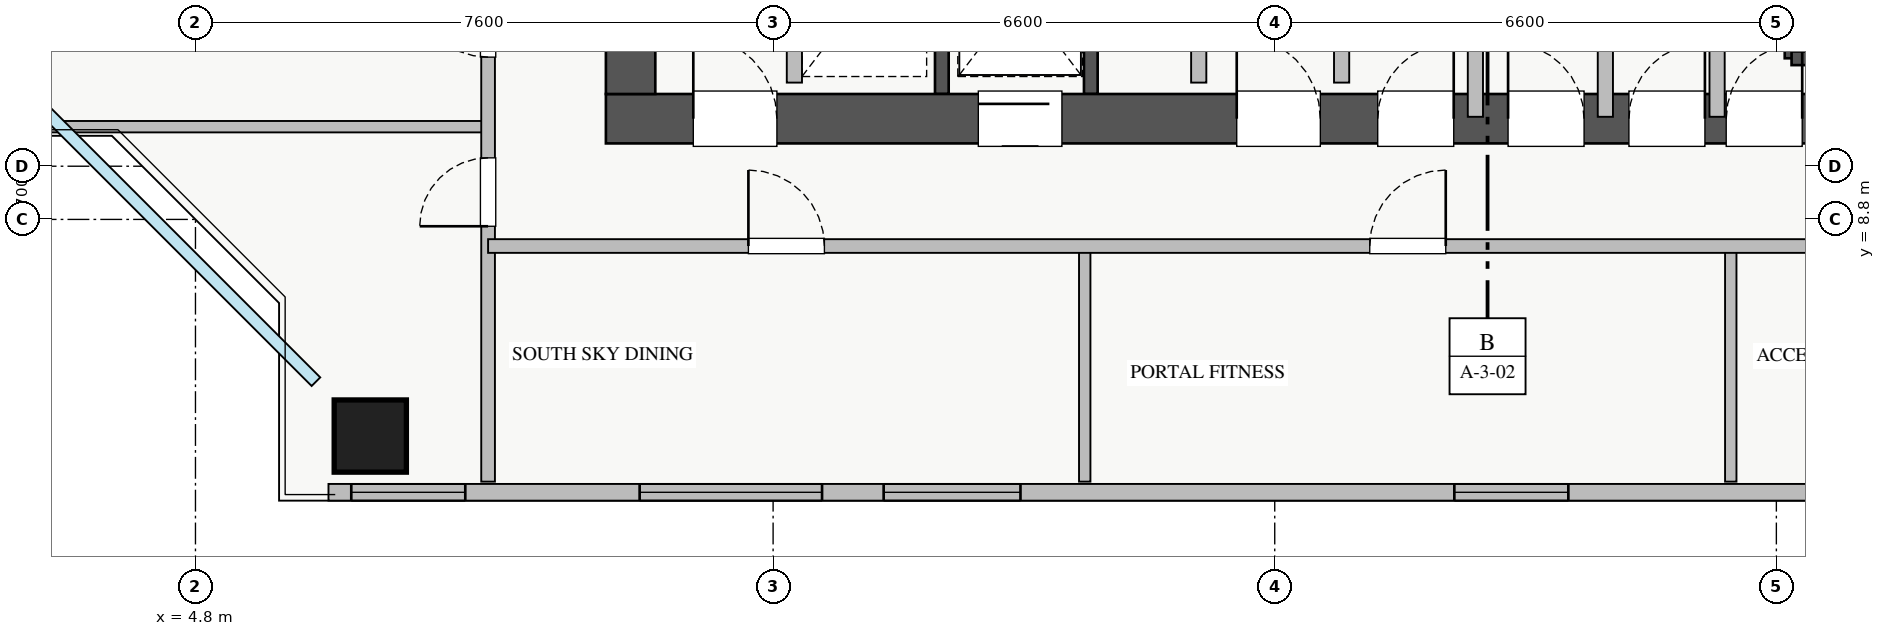
"""IFC4 building model, lengths in metres.
Left out: names, types, materials, properties, quantities, classifications, styles, units other than length and angle.
Written with IfcOpenShell. Run it as: python <this file> out.ifc"""

import sys

from ifc_helpers import new_model, si_unit, direction, frame, frame_2d, origin, origin_2d, place, context, subcontext, project, spatial, rectangle, extrude, source, transform, mapped, element, fill, save


model = new_model("IFC4")
c1 = context("Model", 3, precision=1e-05, world=origin(), true_north=direction((0.0, 1.0)))
c2 = subcontext(c1, "Body", "Model", "MODEL_VIEW")
j1 = project(units=[si_unit("LENGTHUNIT", "METRE"), si_unit("PLANEANGLEUNIT", "RADIAN")], contexts=[c1])
p1 = place(None, origin())
s1 = spatial("IfcSite", under=j1, at=p1, CompositionType="ELEMENT")
p2 = place(p1, origin())
s2 = spatial("IfcBuilding", under=s1, at=p2, CompositionType="ELEMENT")
p3 = place(p2, frame((0.0, 0.0, 153.5)))
s3 = spatial("IfcBuildingStorey", under=s2, at=p3, CompositionType="ELEMENT", Elevation=153.5)
p4 = place(p3, frame((14.62, 10.45, 0.0), z_axis=(0.0, 0.0, 1.0), x_axis=(0.0, 1.0, 0.0)))
e1 = element("IfcWall", 1, at=p4, inside=s3, PredefinedType="SHEAR", context=c2, shape_type="SweptSolid", body=[
    extrude(rectangle(XDim=2.35, YDim=0.18, at=frame_2d((1.175, 0.0))), origin(), (0.0, 0.0, 1.0), 3.07),
])
p5 = place(p3, frame((25.8, 10.92, 0.0), z_axis=(0.0, 0.0, 1.0), x_axis=(0.0, 1.0, 0.0)))
e2 = element("IfcWall", 2, at=p5, inside=s3, PredefinedType="SHEAR", context=c2, shape_type="SweptSolid", body=[
    extrude(rectangle(XDim=1.06, YDim=0.18, at=frame_2d((0.53, 0.0))), origin(), (0.0, 0.0, 1.0), 3.07),
])
p6 = place(p3, frame((25.8, 10.92, 0.0), z_axis=(0.0, 0.0, 1.0), x_axis=(1.0, 0.0, 0.0)))
e3 = element("IfcWall", 3, at=p6, inside=s3, PredefinedType="SHEAR", context=c2, shape_type="SweptSolid", body=[
    extrude(rectangle(XDim=1.35, YDim=0.18, at=frame_2d((0.675, 0.0))), origin(), (0.0, 0.0, 1.0), 3.07),
])
p7 = place(p3, frame((16.58, 10.45, 0.0), z_axis=(0.0, 0.0, 1.0), x_axis=(0.0, 1.0, 0.0)))
e4 = element("IfcWall", 4, at=p7, inside=s3, PredefinedType="SHEAR", context=c2, shape_type="SweptSolid", body=[
    extrude(rectangle(XDim=2.35, YDim=0.18, at=frame_2d((1.175, 0.0))), origin(), (0.0, 0.0, 1.0), 3.07),
])
p8 = place(p3, frame((10.2, 10.125, 0.0), z_axis=(0.0, 0.0, 1.0), x_axis=(1.0, 0.0, 0.0)))
e5 = element("IfcWall", 5, at=p8, inside=s3, PredefinedType="SHEAR", context=c2, shape_type="SweptSolid", body=[
    extrude(rectangle(XDim=17.6, YDim=0.65, at=frame_2d((8.8, 0.0))), origin(), (0.0, 0.0, 1.0), 3.25),
])
p9 = place(p8, frame((1.15, 0.0, 0.0)))
e6 = element("IfcOpeningElement", 6, at=p9, cuts=e5, PredefinedType="OPENING", context=c2, shape_type="SweptSolid", body=[
    extrude(rectangle(XDim=1.1, YDim=2.05, at=frame_2d((0.55, 1.025))), frame((0.0, 0.335, 0.0), z_axis=(0.0, -1.0, 0.0), x_axis=(1.0, 0.0, 0.0)), (0.0, 0.0, 1.0), 0.67),
])
p10 = place(p8, frame((8.3, 0.0, 0.0)))
e7 = element("IfcOpeningElement", 7, at=p10, cuts=e5, PredefinedType="OPENING", context=c2, shape_type="SweptSolid", body=[
    extrude(rectangle(XDim=1.1, YDim=2.05, at=frame_2d((0.55, 1.025))), frame((0.0, 0.335, 0.0), z_axis=(0.0, -1.0, 0.0), x_axis=(1.0, 0.0, 0.0)), (0.0, 0.0, 1.0), 0.67),
])
p11 = place(p8, frame((4.9, 0.0, 0.0)))
e8 = element("IfcOpeningElement", 8, at=p11, cuts=e5, PredefinedType="OPENING", context=c2, shape_type="SweptSolid", body=[
    extrude(rectangle(XDim=1.1, YDim=2.05, at=frame_2d((0.55, 1.025))), frame((0.0, 0.335, 0.0), z_axis=(0.0, -1.0, 0.0), x_axis=(1.0, 0.0, 0.0)), (0.0, 0.0, 1.0), 0.67),
])
p12 = place(p8, frame((14.74, 0.0, 0.0)))
e9 = element("IfcOpeningElement", 9, at=p12, cuts=e5, PredefinedType="OPENING", context=c2, shape_type="SweptSolid", body=[
    extrude(rectangle(XDim=1.0, YDim=2.05, at=frame_2d((0.5, 1.025))), frame((0.0, 0.335, 0.0), z_axis=(0.0, -1.0, 0.0), x_axis=(1.0, 0.0, 0.0)), (0.0, 0.0, 1.0), 0.67),
])
p13 = place(p8, frame((10.155, 0.0, 0.0)))
e10 = element("IfcOpeningElement", 10, at=p13, cuts=e5, PredefinedType="OPENING", context=c2, shape_type="SweptSolid", body=[
    extrude(rectangle(XDim=1.0, YDim=2.05, at=frame_2d((0.5, 1.025))), frame((0.0, 0.335, 0.0), z_axis=(0.0, -1.0, 0.0), x_axis=(1.0, 0.0, 0.0)), (0.0, 0.0, 1.0), 0.67),
])
p14 = place(p8, frame((11.87, 0.0, 0.0)))
e11 = element("IfcOpeningElement", 11, at=p14, cuts=e5, PredefinedType="OPENING", context=c2, shape_type="SweptSolid", body=[
    extrude(rectangle(XDim=1.0, YDim=2.05, at=frame_2d((0.5, 1.025))), frame((0.0, 0.335, 0.0), z_axis=(0.0, -1.0, 0.0), x_axis=(1.0, 0.0, 0.0)), (0.0, 0.0, 1.0), 0.67),
])
p15 = place(p8, frame((13.46, 0.0, 0.0)))
e12 = element("IfcOpeningElement", 12, at=p15, cuts=e5, PredefinedType="OPENING", context=c2, shape_type="SweptSolid", body=[
    extrude(rectangle(XDim=1.0, YDim=2.05, at=frame_2d((0.5, 1.025))), frame((0.0, 0.335, 0.0), z_axis=(0.0, -1.0, 0.0), x_axis=(1.0, 0.0, 0.0)), (0.0, 0.0, 1.0), 0.67),
])
p16 = place(p3, frame((10.525, 10.45, 0.0), z_axis=(0.0, 0.0, 1.0), x_axis=(0.0, 1.0, 0.0)))
e13 = element("IfcWall", 13, at=p16, inside=s3, PredefinedType="SHEAR", context=c2, shape_type="SweptSolid", body=[
    extrude(rectangle(XDim=5.9, YDim=0.65, at=frame_2d((2.95, 0.0))), origin(), (0.0, 0.0, 1.0), 3.25),
])
m1 = source(origin(), c2, "Body", "SweptSolid", [
    extrude(rectangle(XDim=0.95, YDim=0.95, at=origin_2d()), origin(), (0.0, 0.0, 1.0), 3.25),
])
p17 = place(p3, frame((7.1, 5.95, 0.0), z_axis=(0.0, 0.0, 1.0), x_axis=(1.0, 0.0, 0.0)))
e14 = element("IfcColumn", 14, at=p17, inside=s3, PredefinedType="COLUMN", context=c2, shape_type="MappedRepresentation", body=[
    mapped(m1, transform((0.0, 0.0, 0.0), x_axis=(1.0, 0.0, 0.0), y_axis=(0.0, 1.0, 0.0), z_axis=(0.0, 0.0, 1.0), scale=1.0)),
])
p18 = place(p3, frame((6.55, 5.21, 0.0), z_axis=(0.0, 0.0, 1.0), x_axis=(1.0, 0.0, 0.0)))
e15 = element("IfcWall", 15, at=p18, inside=s3, PredefinedType="STANDARD", context=c2, shape_type="SweptSolid", body=[
    extrude(rectangle(XDim=24.9, YDim=0.22, at=frame_2d((12.45, 0.0))), origin(), (0.0, 0.0, 1.0), 2.61),
])
p19 = place(p18, frame((0.3, 0.0, 0.9)))
e16 = element("IfcOpeningElement", 16, at=p19, cuts=e15, PredefinedType="OPENING", context=c2, shape_type="SweptSolid", body=[
    extrude(rectangle(XDim=1.5, YDim=1.5, at=frame_2d((0.75, 0.75))), frame((0.0, 0.12, 0.0), z_axis=(0.0, -1.0, 0.0), x_axis=(1.0, 0.0, 0.0)), (0.0, 0.0, 1.0), 0.24),
])
p20 = place(p18, frame((7.304, 0.0, 0.9)))
e17 = element("IfcOpeningElement", 17, at=p20, cuts=e15, PredefinedType="OPENING", context=c2, shape_type="SweptSolid", body=[
    extrude(rectangle(XDim=1.8, YDim=1.5, at=frame_2d((0.9, 0.75))), frame((0.0, 0.12, 0.0), z_axis=(0.0, -1.0, 0.0), x_axis=(1.0, 0.0, 0.0)), (0.0, 0.0, 1.0), 0.24),
])
p21 = place(p18, frame((14.813, 0.0, 0.9)))
e18 = element("IfcOpeningElement", 18, at=p21, cuts=e15, PredefinedType="OPENING", context=c2, shape_type="SweptSolid", body=[
    extrude(rectangle(XDim=1.5, YDim=1.45, at=frame_2d((0.75, 0.725))), frame((0.0, 0.12, 0.0), z_axis=(0.0, -1.0, 0.0), x_axis=(1.0, 0.0, 0.0)), (0.0, 0.0, 1.0), 0.24),
])
p22 = place(p18, frame((20.738, 0.0, 0.9)))
e19 = element("IfcOpeningElement", 19, at=p22, cuts=e15, PredefinedType="OPENING", context=c2, shape_type="SweptSolid", body=[
    extrude(rectangle(XDim=2.1, YDim=1.48, at=frame_2d((1.05, 0.74))), frame((0.0, 0.12, 0.0), z_axis=(0.0, -1.0, 0.0), x_axis=(1.0, 0.0, 0.0)), (0.0, 0.0, 1.0), 0.24),
])
p23 = place(p18, frame((4.094, 0.0, 0.9)))
e20 = element("IfcOpeningElement", 20, at=p23, cuts=e15, PredefinedType="OPENING", context=c2, shape_type="SweptSolid", body=[
    extrude(rectangle(XDim=2.4, YDim=1.5, at=frame_2d((1.2, 0.75))), frame((0.0, 0.12, 0.0), z_axis=(0.0, -1.0, 0.0), x_axis=(1.0, 0.0, 0.0)), (0.0, 0.0, 1.0), 0.24),
])
for number, where, z_axis, x_axis in (
    (21, (12.68, 10.6, 0.0), (0.0, 0.0, 1.0), (0.0, 1.0, 0.0)),
    (22, (18.0, 10.6, 0.0), (0.0, 0.0, 1.0), (0.0, 1.0, 0.0)),
    (23, (19.88, 10.6, 0.0), (0.0, 0.0, 1.0), (0.0, 1.0, 0.0)),
):
    element("IfcWall", number, at=place(p3, frame(where, z_axis=z_axis, x_axis=x_axis)), inside=s3, PredefinedType="PARTITIONING", context=c2, shape_type="SweptSolid", body=[
        extrude(rectangle(XDim=2.21, YDim=0.2, at=frame_2d((1.105, 0.0))), origin(), (0.0, 0.0, 1.0), 3.07),
    ])
for number, where, z_axis, x_axis in (
    (24, (24.82, 10.15, 0.0), (0.0, 0.0, 1.0), (0.0, 1.0, 0.0)),
    (25, (21.64, 10.15, 0.0), (0.0, 0.0, 1.0), (0.0, 1.0, 0.0)),
    (26, (23.35, 10.15, 0.0), (0.0, 0.0, 1.0), (0.0, 1.0, 0.0)),
):
    element("IfcWall", number, at=place(p3, frame(where, z_axis=z_axis, x_axis=x_axis)), inside=s3, PredefinedType="PARTITIONING", context=c2, shape_type="SweptSolid", body=[
        extrude(rectangle(XDim=2.65, YDim=0.2, at=frame_2d((1.325, 0.0))), origin(), (0.0, 0.0, 1.0), 3.07),
    ])
p24 = place(p3, frame((1.35, 10.02, 0.0), z_axis=(0.0, 0.0, 1.0), x_axis=(1.0, 0.0, 0.0)))
e27 = element("IfcWall", 27, at=p24, inside=s3, PredefinedType="PARTITIONING", context=c2, shape_type="SweptSolid", body=[
    extrude(rectangle(XDim=7.3, YDim=0.15, at=frame_2d((3.65, 0.0))), origin(), (0.0, 0.0, 1.0), 3.07),
])
p25 = place(p3, frame((8.65, 5.35, 0.0), z_axis=(0.0, 0.0, 1.0), x_axis=(0.0, 1.0, 0.0)))
e28 = element("IfcWall", 28, at=p25, inside=s3, PredefinedType="PARTITIONING", context=c2, shape_type="SweptSolid", body=[
    extrude(rectangle(XDim=11.35, YDim=0.18, at=frame_2d((5.675, 0.0))), origin(), (0.0, 0.0, 1.0), 3.07),
])
p26 = place(p25, frame((3.36, 0.0, 0.0)))
e29 = element("IfcOpeningElement", 29, at=p26, cuts=e28, PredefinedType="OPENING", context=c2, shape_type="SweptSolid", body=[
    extrude(rectangle(XDim=0.9, YDim=2.05, at=frame_2d((0.45, 1.025))), frame((0.0, 0.1, 0.0), z_axis=(0.0, -1.0, 0.0), x_axis=(1.0, 0.0, 0.0)), (0.0, 0.0, 1.0), 0.2),
])
p27 = place(p25, frame((5.585, 0.0, 0.0)))
e30 = element("IfcOpeningElement", 30, at=p27, cuts=e28, PredefinedType="OPENING", context=c2, shape_type="SweptSolid", body=[
    extrude(rectangle(XDim=1.0, YDim=2.05, at=frame_2d((0.5, 1.025))), frame((0.0, 0.1, 0.0), z_axis=(0.0, -1.0, 0.0), x_axis=(1.0, 0.0, 0.0)), (0.0, 0.0, 1.0), 0.2),
])
for number, where, z_axis, x_axis in (
    (31, (16.5, 5.35, 0.0), (0.0, 0.0, 1.0), (0.0, 1.0, 0.0)),
    (32, (25.0, 5.35, 0.0), (0.0, 0.0, 1.0), (0.0, 1.0, 0.0)),
):
    element("IfcWall", number, at=place(p3, frame(where, z_axis=z_axis, x_axis=x_axis)), inside=s3, PredefinedType="PARTITIONING", context=c2, shape_type="SweptSolid", body=[
        extrude(rectangle(XDim=3.1, YDim=0.15, at=frame_2d((1.55, 0.0))), origin(), (0.0, 0.0, 1.0), 3.07),
    ])
p28 = place(p3, frame((8.65, 8.45, 0.0), z_axis=(0.0, 0.0, 1.0), x_axis=(1.0, 0.0, 0.0)))
e33 = element("IfcWall", 33, at=p28, inside=s3, PredefinedType="PARTITIONING", context=c2, shape_type="SweptSolid", body=[
    extrude(rectangle(XDim=23.8, YDim=0.18, at=frame_2d((11.9, 0.0))), origin(), (0.0, 0.0, 1.0), 3.07),
])
p29 = place(p28, frame((3.425, 0.0, 0.0)))
e34 = element("IfcOpeningElement", 34, at=p29, cuts=e33, PredefinedType="OPENING", context=c2, shape_type="SweptSolid", body=[
    extrude(rectangle(XDim=1.0, YDim=2.05, at=frame_2d((0.5, 1.025))), frame((0.0, 0.1, 0.0), z_axis=(0.0, -1.0, 0.0), x_axis=(1.0, 0.0, 0.0)), (0.0, 0.0, 1.0), 0.2),
])
p30 = place(p28, frame((11.6, 0.0, 0.0)))
e35 = element("IfcOpeningElement", 35, at=p30, cuts=e33, PredefinedType="OPENING", context=c2, shape_type="SweptSolid", body=[
    extrude(rectangle(XDim=1.0, YDim=2.05, at=frame_2d((0.5, 1.025))), frame((0.0, 0.1, 0.0), z_axis=(0.0, -1.0, 0.0), x_axis=(1.0, 0.0, 0.0)), (0.0, 0.0, 1.0), 0.2),
])
p31 = place(p28, frame((19.575, 0.0, 0.0)))
e36 = element("IfcOpeningElement", 36, at=p31, cuts=e33, PredefinedType="OPENING", context=c2, shape_type="SweptSolid", body=[
    extrude(rectangle(XDim=1.0, YDim=2.05, at=frame_2d((0.5, 1.025))), frame((0.0, 0.1, 0.0), z_axis=(0.0, -1.0, 0.0), x_axis=(1.0, 0.0, 0.0)), (0.0, 0.0, 1.0), 0.2),
])
m2 = source(origin(), c2, "Body", "SweptSolid", [
    extrude(rectangle(XDim=1.5, YDim=1.5, at=frame_2d((0.75, 0.75))), frame((0.0, 0.03, 0.0), z_axis=(0.0, -1.0, 0.0), x_axis=(1.0, 0.0, 0.0)), (0.0, 0.0, 1.0), 0.06),
])
p32 = place(p19, origin())
e37 = element("IfcWindow", 37, at=p32, inside=s3, PartitioningType="TRIPLE_PANEL_VERTICAL", PredefinedType="WINDOW", context=c2, shape_type="MappedRepresentation", body=[
    mapped(m2, transform((0.0, 0.0, 0.0), x_axis=(1.0, 0.0, 0.0), y_axis=(0.0, 1.0, 0.0), z_axis=(0.0, 0.0, 1.0), scale=1.0)),
])
fill(e16, e37)
m3 = source(origin(), c2, "Body", "SweptSolid", [
    extrude(rectangle(XDim=1.8, YDim=1.5, at=frame_2d((0.9, 0.75))), frame((0.0, 0.03, 0.0), z_axis=(0.0, -1.0, 0.0), x_axis=(1.0, 0.0, 0.0)), (0.0, 0.0, 1.0), 0.06),
])
p33 = place(p20, origin())
e38 = element("IfcWindow", 38, at=p33, inside=s3, PartitioningType="DOUBLE_PANEL_VERTICAL", PredefinedType="WINDOW", context=c2, shape_type="MappedRepresentation", body=[
    mapped(m3, transform((0.0, 0.0, 0.0), x_axis=(1.0, 0.0, 0.0), y_axis=(0.0, 1.0, 0.0), z_axis=(0.0, 0.0, 1.0), scale=1.0)),
])
fill(e17, e38)
m4 = source(origin(), c2, "Body", "SweptSolid", [
    extrude(rectangle(XDim=1.5, YDim=1.45, at=frame_2d((0.75, 0.725))), frame((0.0, 0.03, 0.0), z_axis=(0.0, -1.0, 0.0), x_axis=(1.0, 0.0, 0.0)), (0.0, 0.0, 1.0), 0.06),
])
p34 = place(p21, origin())
e39 = element("IfcWindow", 39, at=p34, inside=s3, PartitioningType="DOUBLE_PANEL_VERTICAL", PredefinedType="WINDOW", context=c2, shape_type="MappedRepresentation", body=[
    mapped(m4, transform((0.0, 0.0, 0.0), x_axis=(1.0, 0.0, 0.0), y_axis=(0.0, 1.0, 0.0), z_axis=(0.0, 0.0, 1.0), scale=1.0)),
])
fill(e18, e39)
m5 = source(origin(), c2, "Body", "SweptSolid", [
    extrude(rectangle(XDim=1.1, YDim=2.05, at=frame_2d((0.55, 1.025))), frame((0.0, 0.025, 0.0), z_axis=(0.0, -1.0, 0.0), x_axis=(1.0, 0.0, 0.0)), (0.0, 0.0, 1.0), 0.05),
])
p35 = place(p9, origin())
e40 = element("IfcDoor", 40, at=p35, inside=s3, OperationType="SINGLE_SWING_LEFT", PredefinedType="DOOR", context=c2, shape_type="MappedRepresentation", body=[
    mapped(m5, transform((0.0, 0.0, 0.0), x_axis=(1.0, 0.0, 0.0), y_axis=(0.0, 1.0, 0.0), z_axis=(0.0, 0.0, 1.0), scale=1.0)),
])
fill(e6, e40)
p36 = place(p10, origin())
e41 = element("IfcDoor", 41, at=p36, inside=s3, OperationType="SINGLE_SWING_LEFT", PredefinedType="DOOR", context=c2, shape_type="MappedRepresentation", body=[
    mapped(m5, transform((0.0, 0.0, 0.0), x_axis=(1.0, 0.0, 0.0), y_axis=(0.0, 1.0, 0.0), z_axis=(0.0, 0.0, 1.0), scale=1.0)),
])
fill(e7, e41)
p37 = place(p11, origin())
e42 = element("IfcDoor", 42, at=p37, inside=s3, OperationType="SLIDING_TO_RIGHT", PredefinedType="DOOR", context=c2, shape_type="MappedRepresentation", body=[
    mapped(m5, transform((0.0, 0.0, 0.0), x_axis=(1.0, 0.0, 0.0), y_axis=(0.0, 1.0, 0.0), z_axis=(0.0, 0.0, 1.0), scale=1.0)),
])
fill(e8, e42)
m6 = source(origin(), c2, "Body", "SweptSolid", [
    extrude(rectangle(XDim=1.0, YDim=2.05, at=frame_2d((0.5, 1.025))), frame((0.0, 0.025, 0.0), z_axis=(0.0, -1.0, 0.0), x_axis=(1.0, 0.0, 0.0)), (0.0, 0.0, 1.0), 0.05),
])
p38 = place(p12, origin())
e43 = element("IfcDoor", 43, at=p38, inside=s3, OperationType="SINGLE_SWING_RIGHT", PredefinedType="DOOR", context=c2, shape_type="MappedRepresentation", body=[
    mapped(m6, transform((0.0, 0.0, 0.0), x_axis=(1.0, 0.0, 0.0), y_axis=(0.0, 1.0, 0.0), z_axis=(0.0, 0.0, 1.0), scale=1.0)),
])
fill(e9, e43)
p39 = place(p13, origin())
e44 = element("IfcDoor", 44, at=p39, inside=s3, OperationType="SINGLE_SWING_RIGHT", PredefinedType="DOOR", context=c2, shape_type="MappedRepresentation", body=[
    mapped(m6, transform((0.0, 0.0, 0.0), x_axis=(1.0, 0.0, 0.0), y_axis=(0.0, 1.0, 0.0), z_axis=(0.0, 0.0, 1.0), scale=1.0)),
])
fill(e10, e44)
p40 = place(p14, origin())
e45 = element("IfcDoor", 45, at=p40, inside=s3, OperationType="SINGLE_SWING_LEFT", PredefinedType="DOOR", context=c2, shape_type="MappedRepresentation", body=[
    mapped(m6, transform((0.0, 0.0, 0.0), x_axis=(1.0, 0.0, 0.0), y_axis=(0.0, 1.0, 0.0), z_axis=(0.0, 0.0, 1.0), scale=1.0)),
])
fill(e11, e45)
p41 = place(p15, origin())
e46 = element("IfcDoor", 46, at=p41, inside=s3, OperationType="SINGLE_SWING_RIGHT", PredefinedType="DOOR", context=c2, shape_type="MappedRepresentation", body=[
    mapped(m6, transform((0.0, 0.0, 0.0), x_axis=(1.0, 0.0, 0.0), y_axis=(0.0, 1.0, 0.0), z_axis=(0.0, 0.0, 1.0), scale=1.0)),
])
fill(e12, e46)
m7 = source(origin(), c2, "Body", "SweptSolid", [
    extrude(rectangle(XDim=0.9, YDim=2.05, at=frame_2d((0.45, 1.025))), frame((0.0, 0.025, 0.0), z_axis=(0.0, -1.0, 0.0), x_axis=(1.0, 0.0, 0.0)), (0.0, 0.0, 1.0), 0.05),
])
p42 = place(p26, origin())
e47 = element("IfcDoor", 47, at=p42, inside=s3, OperationType="SINGLE_SWING_LEFT", PredefinedType="DOOR", context=c2, shape_type="MappedRepresentation", body=[
    mapped(m7, transform((0.0, 0.0, 0.0), x_axis=(1.0, 0.0, 0.0), y_axis=(0.0, 1.0, 0.0), z_axis=(0.0, 0.0, 1.0), scale=1.0)),
])
fill(e29, e47)
p43 = place(p27, origin())
e48 = element("IfcDoor", 48, at=p43, inside=s3, OperationType="SINGLE_SWING_RIGHT", PredefinedType="DOOR", context=c2, shape_type="MappedRepresentation", body=[
    mapped(m6, transform((0.0, 0.0, 0.0), x_axis=(1.0, 0.0, 0.0), y_axis=(0.0, 1.0, 0.0), z_axis=(0.0, 0.0, 1.0), scale=1.0)),
])
fill(e30, e48)
p44 = place(p29, origin())
e49 = element("IfcDoor", 49, at=p44, inside=s3, OperationType="SINGLE_SWING_LEFT", PredefinedType="DOOR", context=c2, shape_type="MappedRepresentation", body=[
    mapped(m6, transform((0.0, 0.0, 0.0), x_axis=(1.0, 0.0, 0.0), y_axis=(0.0, 1.0, 0.0), z_axis=(0.0, 0.0, 1.0), scale=1.0)),
])
fill(e34, e49)
p45 = place(p30, origin())
e50 = element("IfcDoor", 50, at=p45, inside=s3, OperationType="SINGLE_SWING_RIGHT", PredefinedType="DOOR", context=c2, shape_type="MappedRepresentation", body=[
    mapped(m6, transform((0.0, 0.0, 0.0), x_axis=(1.0, 0.0, 0.0), y_axis=(0.0, 1.0, 0.0), z_axis=(0.0, 0.0, 1.0), scale=1.0)),
])
fill(e35, e50)
m8 = source(origin(), c2, "Body", "SweptSolid", [
    extrude(rectangle(XDim=2.4, YDim=1.5, at=frame_2d((1.2, 0.75))), frame((0.0, 0.03, 0.0), z_axis=(0.0, -1.0, 0.0), x_axis=(1.0, 0.0, 0.0)), (0.0, 0.0, 1.0), 0.06),
])
p46 = place(p23, origin())
e51 = element("IfcWindow", 51, at=p46, inside=s3, PartitioningType="TRIPLE_PANEL_VERTICAL", PredefinedType="WINDOW", context=c2, shape_type="MappedRepresentation", body=[
    mapped(m8, transform((0.0, 0.0, 0.0), x_axis=(1.0, 0.0, 0.0), y_axis=(0.0, 1.0, 0.0), z_axis=(0.0, 0.0, 1.0), scale=1.0)),
])
fill(e20, e51)
save(model, sys.argv[1])
